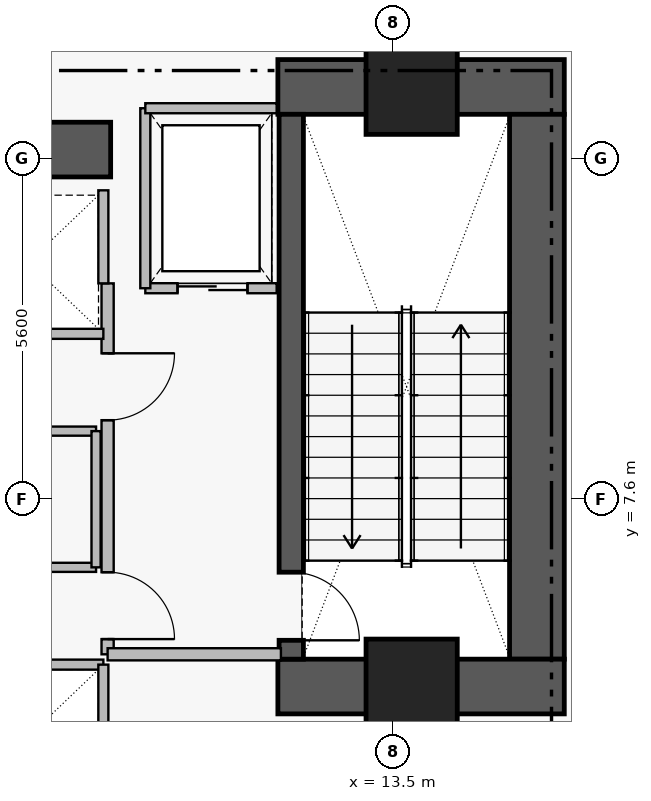
"""IFC4 building model, lengths in metres.
Left out: names, types, materials, properties, quantities, classifications, styles, units other than length and angle.
Written with IfcOpenShell. Run it as: python <this file> out.ifc"""

import sys

from ifc_helpers import new_model, si_unit, direction, frame, frame_2d, origin, origin_2d, place, context, subcontext, project, spatial, rectangle, extrude, element, fill, save


model = new_model("IFC4")
c1 = context("Model", 3, precision=1e-05, world=origin(), true_north=direction((0.0, 1.0)))
c2 = subcontext(c1, "Body", "Model", "MODEL_VIEW")
j1 = project(units=[si_unit("LENGTHUNIT", "METRE"), si_unit("PLANEANGLEUNIT", "RADIAN")], contexts=[c1])
p1 = place(None, origin())
s1 = spatial("IfcSite", under=j1, at=p1, CompositionType="ELEMENT")
p2 = place(p1, origin())
s2 = spatial("IfcBuilding", under=s1, at=p2, CompositionType="ELEMENT")
p3 = place(p2, frame((0.0, 0.0, 22.8)))
s3 = spatial("IfcBuildingStorey", under=s2, at=p3, CompositionType="ELEMENT", Elevation=22.8)
p4 = place(p3, frame((11.6, 14.38, 0.0), z_axis=(0.0, 0.0, 1.0), x_axis=(1.0, 0.0, 0.0)))
e1 = element("IfcWall", 1, at=p4, inside=s3, PredefinedType="SHEAR", context=c2, shape_type="SweptSolid", body=[
    extrude(rectangle(XDim=4.71, YDim=0.9, at=frame_2d((2.355, 0.0))), origin(), (0.0, 0.0, 1.0), 4.61),
])
p5 = place(p3, frame((15.86, 4.97, 0.0), z_axis=(0.0, 0.0, 1.0), x_axis=(0.0, 1.0, 0.0)))
e2 = element("IfcWall", 2, at=p5, inside=s3, PredefinedType="SHEAR", context=c2, shape_type="SweptSolid", body=[
    extrude(rectangle(XDim=8.96, YDim=0.9, at=frame_2d((4.48, 0.0))), origin(), (0.0, 0.0, 1.0), 4.61),
])
p6 = place(p3, frame((11.6, 4.52, 0.0), z_axis=(0.0, 0.0, 1.0), x_axis=(1.0, 0.0, 0.0)))
e3 = element("IfcWall", 3, at=p6, inside=s3, PredefinedType="SHEAR", context=c2, shape_type="SweptSolid", body=[
    extrude(rectangle(XDim=4.71, YDim=0.9, at=frame_2d((2.355, 0.0))), origin(), (0.0, 0.0, 1.0), 4.61),
])
p7 = place(p3, frame((1.25, 13.35, 0.0), z_axis=(0.0, 0.0, 1.0), x_axis=(1.0, 0.0, 0.0)))
e4 = element("IfcWall", 4, at=p7, inside=s3, PredefinedType="SHEAR", context=c2, shape_type="SweptSolid", body=[
    extrude(rectangle(XDim=7.6, YDim=0.9, at=frame_2d((3.8, 0.0))), origin(), (0.0, 0.0, 1.0), 4.58),
])
p8 = place(p3, frame((11.82, 13.93, 0.0), z_axis=(0.0, 0.0, 1.0), x_axis=(0.0, -1.0, 0.0)))
e5 = element("IfcWall", 5, at=p8, inside=s3, PredefinedType="SHEAR", context=c2, shape_type="SweptSolid", body=[
    extrude(rectangle(XDim=8.96, YDim=0.4, at=frame_2d((4.48, 0.0))), origin(), (0.0, 0.0, 1.0), 4.61),
])
p9 = place(p8, frame((7.53, 0.0, 0.0)))
e6 = element("IfcOpeningElement", 6, at=p9, cuts=e5, PredefinedType="OPENING", context=c2, shape_type="SweptSolid", body=[
    extrude(rectangle(XDim=1.12, YDim=2.22, at=frame_2d((0.56, 1.11))), frame((0.0, 0.21, 0.0), z_axis=(0.0, -1.0, 0.0), x_axis=(1.0, 0.0, 0.0)), (0.0, 0.0, 1.0), 0.42),
])
for number, where, z_axis, x_axis in (
    (7, (13.8, 14.35, 0.0), (0.0, 0.0, 1.0), (1.0, 0.0, 0.0)),
    (8, (13.8, 4.55, 0.0), (0.0, 0.0, 1.0), (1.0, 0.0, 0.0)),
):
    element("IfcColumn", number, at=place(p3, frame(where, z_axis=z_axis, x_axis=x_axis)), inside=s3, PredefinedType="COLUMN", context=c2, shape_type="SweptSolid", body=[
        extrude(rectangle(XDim=1.5, YDim=1.5, at=origin_2d()), origin(), (0.0, 0.0, 1.0), 4.8),
    ])
p10 = place(p3, frame((8.8, 11.15, 0.0), z_axis=(0.0, 0.0, 1.0), x_axis=(0.0, -1.0, 0.0)))
e9 = element("IfcWall", 9, at=p10, inside=s3, PredefinedType="PARTITIONING", context=c2, shape_type="SweptSolid", body=[
    extrude(rectangle(XDim=6.1, YDim=0.2, at=frame_2d((3.05, 0.0))), origin(), (0.0, 0.0, 1.0), 4.58),
])
p11 = place(p10, frame((1.15, 0.0, 0.0)))
e10 = element("IfcOpeningElement", 10, at=p11, cuts=e9, PredefinedType="OPENING", context=c2, shape_type="SweptSolid", body=[
    extrude(rectangle(XDim=1.1, YDim=2.2, at=frame_2d((0.55, 1.1))), frame((0.0, 0.11, 0.0), z_axis=(0.0, -1.0, 0.0), x_axis=(1.0, 0.0, 0.0)), (0.0, 0.0, 1.0), 0.22),
])
p12 = place(p10, frame((4.75, 0.0, 0.0)))
e11 = element("IfcOpeningElement", 11, at=p12, cuts=e9, PredefinedType="OPENING", context=c2, shape_type="SweptSolid", body=[
    extrude(rectangle(XDim=1.1, YDim=2.2, at=frame_2d((0.55, 1.1))), frame((0.0, 0.11, 0.0), z_axis=(0.0, -1.0, 0.0), x_axis=(1.0, 0.0, 0.0)), (0.0, 0.0, 1.0), 0.22),
])
p13 = place(p3, frame((9.42, 11.07, 0.0), z_axis=(0.0, 0.0, 1.0), x_axis=(1.0, 0.0, 0.0)))
e12 = element("IfcWall", 12, at=p13, inside=s3, PredefinedType="PARTITIONING", context=c2, shape_type="SweptSolid", body=[
    extrude(rectangle(XDim=2.16, YDim=0.165, at=frame_2d((1.08, 0.0))), origin(), (0.0, 0.0, 1.0), 4.58),
])
p14 = place(p13, frame((0.53, 0.0, 0.0)))
e13 = element("IfcOpeningElement", 13, at=p14, cuts=e12, PredefinedType="OPENING", context=c2, shape_type="SweptSolid", body=[
    extrude(rectangle(XDim=1.15, YDim=2.25, at=frame_2d((0.575, 1.125))), frame((0.0, 0.093, 0.0), z_axis=(0.0, -1.0, 0.0), x_axis=(1.0, 0.0, 0.0)), (0.0, 0.0, 1.0), 0.185),
])
p15 = place(p3, frame((6.14, 8.72, 0.0), z_axis=(0.0, 0.0, 1.0), x_axis=(1.0, 0.0, 0.0)))
e14 = element("IfcWall", 14, at=p15, inside=s3, PredefinedType="PARTITIONING", context=c2, shape_type="SweptSolid", body=[
    extrude(rectangle(XDim=2.47, YDim=0.15, at=frame_2d((1.235, 0.0))), origin(), (0.0, 0.0, 1.0), 4.58),
])
p16 = place(p15, frame((0.785, 0.0, 0.0)))
e15 = element("IfcOpeningElement", 15, at=p16, cuts=e14, PredefinedType="OPENING", context=c2, shape_type="SweptSolid", body=[
    extrude(rectangle(XDim=0.9, YDim=2.15, at=frame_2d((0.45, 1.075))), frame((0.0, 0.085, 0.0), z_axis=(0.0, -1.0, 0.0), x_axis=(1.0, 0.0, 0.0)), (0.0, 0.0, 1.0), 0.17),
])
p17 = place(p3, frame((8.8, 5.05, 0.0), z_axis=(0.0, 0.0, 1.0), x_axis=(1.0, 0.0, 0.0)))
e16 = element("IfcWall", 16, at=p17, inside=s3, PredefinedType="PARTITIONING", context=c2, shape_type="SweptSolid", body=[
    extrude(rectangle(XDim=2.85, YDim=0.2, at=frame_2d((1.425, 0.0))), origin(), (0.0, 0.0, 1.0), 4.58),
])
p18 = place(p3, frame((9.42, 11.07, 0.0), z_axis=(0.0, 0.0, 1.0), x_axis=(0.0, 1.0, 0.0)))
e17 = element("IfcWall", 17, at=p18, inside=s3, PredefinedType="PARTITIONING", context=c2, shape_type="SweptSolid", body=[
    extrude(rectangle(XDim=2.96, YDim=0.165, at=frame_2d((1.48, 0.0))), origin(), (0.0, 0.0, 1.0), 4.58),
])
p19 = place(p3, frame((9.42, 14.03, 0.0), z_axis=(0.0, 0.0, 1.0), x_axis=(1.0, 0.0, 0.0)))
e18 = element("IfcWall", 18, at=p19, inside=s3, PredefinedType="PARTITIONING", context=c2, shape_type="SweptSolid", body=[
    extrude(rectangle(XDim=2.16, YDim=0.165, at=frame_2d((1.08, 0.0))), origin(), (0.0, 0.0, 1.0), 4.58),
])
p20 = place(p3, frame((6.25, 4.88, 0.0), z_axis=(0.0, 0.0, 1.0), x_axis=(1.0, 0.0, 0.0)))
e19 = element("IfcWall", 19, at=p20, inside=s3, PredefinedType="PARTITIONING", context=c2, shape_type="SweptSolid", body=[
    extrude(rectangle(XDim=2.48, YDim=0.165, at=frame_2d((1.24, 0.0))), origin(), (0.0, 0.0, 1.0), 4.58),
])
p21 = place(p3, frame((8.73, 2.52, 0.0), z_axis=(0.0, 0.0, 1.0), x_axis=(0.0, 1.0, 0.0)))
e20 = element("IfcWall", 20, at=p21, inside=s3, PredefinedType="PARTITIONING", context=c2, shape_type="SweptSolid", body=[
    extrude(rectangle(XDim=2.36, YDim=0.165, at=frame_2d((1.18, 0.0))), origin(), (0.0, 0.0, 1.0), 4.58),
])
p22 = place(p3, frame((6.25, 10.32, 0.0), z_axis=(0.0, 0.0, 1.0), x_axis=(1.0, 0.0, 0.0)))
e21 = element("IfcWall", 21, at=p22, inside=s3, PredefinedType="PARTITIONING", context=c2, shape_type="SweptSolid", body=[
    extrude(rectangle(XDim=2.48, YDim=0.165, at=frame_2d((1.24, 0.0))), origin(), (0.0, 0.0, 1.0), 4.58),
])
p23 = place(p3, frame((8.73, 11.15, 0.0), z_axis=(0.0, 0.0, 1.0), x_axis=(0.0, 1.0, 0.0)))
e22 = element("IfcWall", 22, at=p23, inside=s3, PredefinedType="PARTITIONING", context=c2, shape_type="SweptSolid", body=[
    extrude(rectangle(XDim=1.53, YDim=0.165, at=frame_2d((0.765, 0.0))), origin(), (0.0, 0.0, 1.0), 4.58),
])
p24 = place(p3, frame((6.14, 6.48, 0.0), z_axis=(0.0, 0.0, 1.0), x_axis=(1.0, 0.0, 0.0)))
e23 = element("IfcWall", 23, at=p24, inside=s3, PredefinedType="PARTITIONING", context=c2, shape_type="SweptSolid", body=[
    extrude(rectangle(XDim=2.47, YDim=0.15, at=frame_2d((1.235, 0.0))), origin(), (0.0, 0.0, 1.0), 4.58),
])
p25 = place(p3, frame((8.61, 6.48, 0.0), z_axis=(0.0, 0.0, 1.0), x_axis=(0.0, 1.0, 0.0)))
e24 = element("IfcWall", 24, at=p25, inside=s3, PredefinedType="PARTITIONING", context=c2, shape_type="SweptSolid", body=[
    extrude(rectangle(XDim=2.24, YDim=0.15, at=frame_2d((1.12, 0.0))), origin(), (0.0, 0.0, 1.0), 4.58),
])
p26 = place(p9, origin())
e25 = element("IfcDoor", 25, at=p26, inside=s3, OperationType="SINGLE_SWING_RIGHT", PredefinedType="DOOR", context=c2, shape_type="SweptSolid", body=[
    extrude(rectangle(XDim=1.12, YDim=2.22, at=frame_2d((0.56, 1.11))), frame((0.0, 0.025, 0.0), z_axis=(0.0, -1.0, 0.0), x_axis=(1.0, 0.0, 0.0)), (0.0, 0.0, 1.0), 0.05),
])
fill(e6, e25)
p27 = place(p11, origin())
e26 = element("IfcDoor", 26, at=p27, inside=s3, OperationType="SINGLE_SWING_LEFT", PredefinedType="DOOR", context=c2, shape_type="SweptSolid", body=[
    extrude(rectangle(XDim=1.1, YDim=2.2, at=frame_2d((0.55, 1.1))), frame((0.0, 0.025, 0.0), z_axis=(0.0, -1.0, 0.0), x_axis=(1.0, 0.0, 0.0)), (0.0, 0.0, 1.0), 0.05),
])
fill(e10, e26)
p28 = place(p12, origin())
e27 = element("IfcDoor", 27, at=p28, inside=s3, OperationType="SINGLE_SWING_RIGHT", PredefinedType="DOOR", context=c2, shape_type="SweptSolid", body=[
    extrude(rectangle(XDim=1.1, YDim=2.2, at=frame_2d((0.55, 1.1))), frame((0.0, 0.025, 0.0), z_axis=(0.0, -1.0, 0.0), x_axis=(1.0, 0.0, 0.0)), (0.0, 0.0, 1.0), 0.05),
])
fill(e11, e27)
p29 = place(p14, origin())
e28 = element("IfcDoor", 28, at=p29, inside=s3, OperationType="SLIDING_TO_LEFT", PredefinedType="DOOR", context=c2, shape_type="SweptSolid", body=[
    extrude(rectangle(XDim=1.15, YDim=2.25, at=frame_2d((0.575, 1.125))), frame((0.0, 0.025, 0.0), z_axis=(0.0, -1.0, 0.0), x_axis=(1.0, 0.0, 0.0)), (0.0, 0.0, 1.0), 0.05),
])
fill(e13, e28)
save(model, sys.argv[1])
